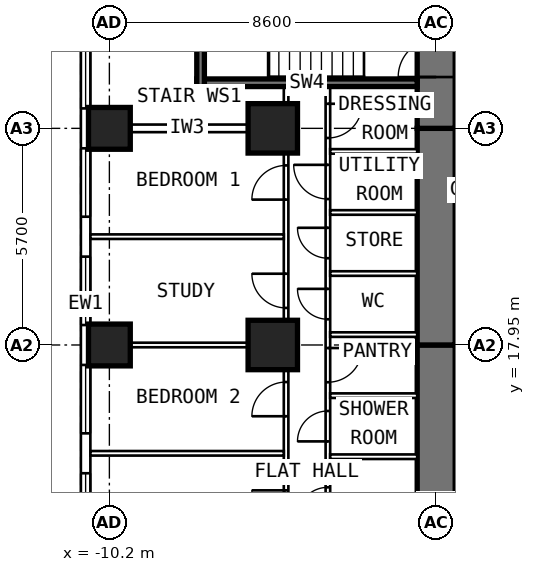
"""IFC4 building model, lengths in metres.
Left out: names, types, materials, properties, quantities, classifications, styles, units other than length and angle.
Written with IfcOpenShell. Run it as: python <this file> out.ifc"""

import sys

from ifc_helpers import new_model, si_unit, direction, frame, frame_2d, origin, origin_2d, place, context, subcontext, project, spatial, rectangle, extrude, element, fill, save


model = new_model("IFC4")
c1 = context("Model", 3, precision=1e-05, world=origin(), true_north=direction((0.0, 1.0)))
c2 = subcontext(c1, "Body", "Model", "MODEL_VIEW")
j1 = project(units=[si_unit("LENGTHUNIT", "METRE"), si_unit("PLANEANGLEUNIT", "RADIAN")], contexts=[c1])
p1 = place(None, origin())
s1 = spatial("IfcSite", under=j1, at=p1, CompositionType="ELEMENT")
p2 = place(p1, origin())
s2 = spatial("IfcBuilding", under=s1, at=p2, CompositionType="ELEMENT")
p3 = place(p2, frame((0.0, 0.0, 39.4)))
s3 = spatial("IfcBuildingStorey", under=s2, at=p3, CompositionType="ELEMENT", Elevation=39.4)
for number, where, z_axis, x_axis in (
    (1, (-10.2, 17.95, 0.0), (0.0, 0.0, 1.0), (0.0, 1.0, 0.0)),
    (2, (-10.2, 23.65, 0.0), (0.0, 0.0, 1.0), (0.0, 1.0, 0.0)),
):
    element("IfcColumn", number, at=place(p3, frame(where, z_axis=z_axis, x_axis=x_axis)), inside=s3, PredefinedType="COLUMN", context=c2, shape_type="SweptSolid", body=[
        extrude(rectangle(XDim=1.1, YDim=1.1, at=origin_2d()), origin(), (0.0, 0.0, 1.0), 3.6),
    ])
for number, where, z_axis, x_axis in (
    (3, (-5.9, 17.95, 0.0), (0.0, 0.0, 1.0), (0.0, 1.0, 0.0)),
    (4, (-5.9, 23.65, 0.0), (0.0, 0.0, 1.0), (0.0, 1.0, 0.0)),
):
    element("IfcColumn", number, at=place(p3, frame(where, z_axis=z_axis, x_axis=x_axis)), inside=s3, PredefinedType="COLUMN", context=c2, shape_type="SweptSolid", body=[
        extrude(rectangle(XDim=1.3, YDim=1.3, at=origin_2d()), origin(), (0.0, 0.0, 1.0), 3.6),
    ])
p4 = place(p3, frame((-1.6, 9.6, 0.0), z_axis=(0.0, 0.0, 1.0), x_axis=(0.0, 1.0, 0.0)))
e5 = element("IfcWall", 5, at=p4, inside=s3, PredefinedType="SHEAR", context=c2, shape_type="SweptSolid", body=[
    extrude(rectangle(XDim=8.35, YDim=1.0, at=frame_2d((4.175, 0.0))), origin(), (0.0, 0.0, 1.0), 3.6),
])
p5 = place(p4, frame((1.3, 0.0, 0.0)))
e6 = element("IfcOpeningElement", 6, at=p5, cuts=e5, PredefinedType="OPENING", context=c2, shape_type="SweptSolid", body=[
    extrude(rectangle(XDim=1.0, YDim=2.1, at=frame_2d((0.5, 1.05))), frame((0.0, 0.512, 0.0), z_axis=(0.0, -1.0, 0.0), x_axis=(1.0, 0.0, 0.0)), (0.0, 0.0, 1.0), 1.024),
])
p6 = place(p3, frame((-1.6, 17.95, 0.0), z_axis=(0.0, 0.0, 1.0), x_axis=(0.0, 1.0, 0.0)))
e7 = element("IfcWall", 7, at=p6, inside=s3, PredefinedType="SHEAR", context=c2, shape_type="SweptSolid", body=[
    extrude(rectangle(XDim=5.7, YDim=1.0, at=frame_2d((2.85, 0.0))), origin(), (0.0, 0.0, 1.0), 3.6),
])
p7 = place(p3, frame((-1.6, 23.65, 0.0), z_axis=(0.0, 0.0, 1.0), x_axis=(0.0, 1.0, 0.0)))
e8 = element("IfcWall", 8, at=p7, inside=s3, PredefinedType="SHEAR", context=c2, shape_type="SweptSolid", body=[
    extrude(rectangle(XDim=10.745, YDim=1.0, at=frame_2d((5.373, 0.0))), origin(), (0.0, 0.0, 1.0), 3.6),
])
p8 = place(p7, frame((6.1, 0.0, 0.0)))
e9 = element("IfcOpeningElement", 9, at=p8, cuts=e8, PredefinedType="OPENING", context=c2, shape_type="SweptSolid", body=[
    extrude(rectangle(XDim=1.0, YDim=2.1, at=frame_2d((0.5, 1.05))), frame((0.0, 0.512, 0.0), z_axis=(0.0, -1.0, 0.0), x_axis=(1.0, 0.0, 0.0)), (0.0, 0.0, 1.0), 1.024),
])
p9 = place(p7, frame((1.35, 0.0, 0.0)))
e10 = element("IfcOpeningElement", 10, at=p9, cuts=e8, PredefinedType="OPENING", context=c2, shape_type="SweptSolid", body=[
    extrude(rectangle(XDim=1.0, YDim=2.1, at=frame_2d((0.5, 1.05))), frame((0.0, 0.512, 0.0), z_axis=(0.0, -1.0, 0.0), x_axis=(1.0, 0.0, 0.0)), (0.0, 0.0, 1.0), 1.024),
])
p10 = place(p3, frame((-10.825, 6.409, 0.0), z_axis=(0.0, 0.0, 1.0), x_axis=(0.0, 1.0, 0.0)))
e11 = element("IfcWall", 11, at=p10, inside=s3, PredefinedType="SOLIDWALL", context=c2, shape_type="SweptSolid", body=[
    extrude(rectangle(XDim=25.226, YDim=0.25, at=frame_2d((12.613, 0.0))), origin(), (0.0, 0.0, 1.0), 3.35),
])
p11 = place(p10, frame((0.666, 0.0, 0.8)))
e12 = element("IfcOpeningElement", 12, at=p11, cuts=e11, PredefinedType="OPENING", context=c2, shape_type="SweptSolid", body=[
    extrude(rectangle(XDim=1.8, YDim=1.8, at=frame_2d((0.9, 0.9))), frame((0.0, 0.137, 0.0), z_axis=(0.0, -1.0, 0.0), x_axis=(1.0, 0.0, 0.0)), (0.0, 0.0, 1.0), 0.274),
])
p12 = place(p10, frame((3.516, 0.0, 0.8)))
e13 = element("IfcOpeningElement", 13, at=p12, cuts=e11, PredefinedType="OPENING", context=c2, shape_type="SweptSolid", body=[
    extrude(rectangle(XDim=1.8, YDim=1.8, at=frame_2d((0.9, 0.9))), frame((0.0, 0.137, 0.0), z_axis=(0.0, -1.0, 0.0), x_axis=(1.0, 0.0, 0.0)), (0.0, 0.0, 1.0), 0.274),
])
p13 = place(p10, frame((6.366, 0.0, 0.8)))
e14 = element("IfcOpeningElement", 14, at=p13, cuts=e11, PredefinedType="OPENING", context=c2, shape_type="SweptSolid", body=[
    extrude(rectangle(XDim=1.8, YDim=1.8, at=frame_2d((0.9, 0.9))), frame((0.0, 0.137, 0.0), z_axis=(0.0, -1.0, 0.0), x_axis=(1.0, 0.0, 0.0)), (0.0, 0.0, 1.0), 0.274),
])
p14 = place(p10, frame((9.216, 0.0, 0.8)))
e15 = element("IfcOpeningElement", 15, at=p14, cuts=e11, PredefinedType="OPENING", context=c2, shape_type="SweptSolid", body=[
    extrude(rectangle(XDim=1.8, YDim=1.8, at=frame_2d((0.9, 0.9))), frame((0.0, 0.137, 0.0), z_axis=(0.0, -1.0, 0.0), x_axis=(1.0, 0.0, 0.0)), (0.0, 0.0, 1.0), 0.274),
])
p15 = place(p10, frame((12.066, 0.0, 0.8)))
e16 = element("IfcOpeningElement", 16, at=p15, cuts=e11, PredefinedType="OPENING", context=c2, shape_type="SweptSolid", body=[
    extrude(rectangle(XDim=1.8, YDim=1.8, at=frame_2d((0.9, 0.9))), frame((0.0, 0.137, 0.0), z_axis=(0.0, -1.0, 0.0), x_axis=(1.0, 0.0, 0.0)), (0.0, 0.0, 1.0), 0.274),
])
p16 = place(p10, frame((14.916, 0.0, 0.8)))
e17 = element("IfcOpeningElement", 17, at=p16, cuts=e11, PredefinedType="OPENING", context=c2, shape_type="SweptSolid", body=[
    extrude(rectangle(XDim=1.8, YDim=1.8, at=frame_2d((0.9, 0.9))), frame((0.0, 0.137, 0.0), z_axis=(0.0, -1.0, 0.0), x_axis=(1.0, 0.0, 0.0)), (0.0, 0.0, 1.0), 0.274),
])
p17 = place(p10, frame((17.766, 0.0, 0.8)))
e18 = element("IfcOpeningElement", 18, at=p17, cuts=e11, PredefinedType="OPENING", context=c2, shape_type="SweptSolid", body=[
    extrude(rectangle(XDim=1.8, YDim=1.8, at=frame_2d((0.9, 0.9))), frame((0.0, 0.137, 0.0), z_axis=(0.0, -1.0, 0.0), x_axis=(1.0, 0.0, 0.0)), (0.0, 0.0, 1.0), 0.274),
])
p18 = place(p10, frame((20.616, 0.0, 0.8)))
e19 = element("IfcOpeningElement", 19, at=p18, cuts=e11, PredefinedType="OPENING", context=c2, shape_type="SweptSolid", body=[
    extrude(rectangle(XDim=1.8, YDim=1.8, at=frame_2d((0.9, 0.9))), frame((0.0, 0.137, 0.0), z_axis=(0.0, -1.0, 0.0), x_axis=(1.0, 0.0, 0.0)), (0.0, 0.0, 1.0), 0.274),
])
p19 = place(p3, frame((-4.45, 10.1, 0.0), z_axis=(0.0, 0.0, 1.0), x_axis=(0.0, 1.0, 0.0)))
e20 = element("IfcWall", 20, at=p19, inside=s3, PredefinedType="PARTITIONING", context=c2, shape_type="SweptSolid", body=[
    extrude(rectangle(XDim=14.65, YDim=0.12, at=frame_2d((7.325, 0.0))), origin(), (0.0, 0.0, 1.0), 3.35),
])
p20 = place(p19, frame((0.75, 0.0, 0.0)))
e21 = element("IfcOpeningElement", 21, at=p20, cuts=e20, PredefinedType="OPENING", context=c2, shape_type="SweptSolid", body=[
    extrude(rectangle(XDim=0.9, YDim=2.1, at=frame_2d((0.45, 1.05))), frame((0.0, 0.072, 0.0), z_axis=(0.0, -1.0, 0.0), x_axis=(1.0, 0.0, 0.0)), (0.0, 0.0, 1.0), 0.144),
])
p21 = place(p19, frame((3.305, 0.0, 0.0)))
e22 = element("IfcOpeningElement", 22, at=p21, cuts=e20, PredefinedType="OPENING", context=c2, shape_type="SweptSolid", body=[
    extrude(rectangle(XDim=0.8, YDim=2.1, at=frame_2d((0.4, 1.05))), frame((0.0, 0.072, 0.0), z_axis=(0.0, -1.0, 0.0), x_axis=(1.0, 0.0, 0.0)), (0.0, 0.0, 1.0), 0.144),
])
p22 = place(p19, frame((5.313, 0.0, 0.0)))
e23 = element("IfcOpeningElement", 23, at=p22, cuts=e20, PredefinedType="OPENING", context=c2, shape_type="SweptSolid", body=[
    extrude(rectangle(XDim=0.8, YDim=2.1, at=frame_2d((0.4, 1.05))), frame((0.0, 0.072, 0.0), z_axis=(0.0, -1.0, 0.0), x_axis=(1.0, 0.0, 0.0)), (0.0, 0.0, 1.0), 0.144),
])
p23 = place(p19, frame((6.87, 0.0, 0.0)))
e24 = element("IfcOpeningElement", 24, at=p23, cuts=e20, PredefinedType="OPENING", context=c2, shape_type="SweptSolid", body=[
    extrude(rectangle(XDim=0.9, YDim=2.1, at=frame_2d((0.45, 1.05))), frame((0.0, 0.072, 0.0), z_axis=(0.0, -1.0, 0.0), x_axis=(1.0, 0.0, 0.0)), (0.0, 0.0, 1.0), 0.144),
])
p24 = place(p19, frame((8.527, 0.0, 0.0)))
e25 = element("IfcOpeningElement", 25, at=p24, cuts=e20, PredefinedType="OPENING", context=c2, shape_type="SweptSolid", body=[
    extrude(rectangle(XDim=0.8, YDim=2.1, at=frame_2d((0.4, 1.05))), frame((0.0, 0.072, 0.0), z_axis=(0.0, -1.0, 0.0), x_axis=(1.0, 0.0, 0.0)), (0.0, 0.0, 1.0), 0.144),
])
p25 = place(p19, frame((10.133, 0.0, 0.0)))
e26 = element("IfcOpeningElement", 26, at=p25, cuts=e20, PredefinedType="OPENING", context=c2, shape_type="SweptSolid", body=[
    extrude(rectangle(XDim=0.8, YDim=2.1, at=frame_2d((0.4, 1.05))), frame((0.0, 0.072, 0.0), z_axis=(0.0, -1.0, 0.0), x_axis=(1.0, 0.0, 0.0)), (0.0, 0.0, 1.0), 0.144),
])
p26 = place(p19, frame((11.69, 0.0, 0.0)))
e27 = element("IfcOpeningElement", 27, at=p26, cuts=e20, PredefinedType="OPENING", context=c2, shape_type="SweptSolid", body=[
    extrude(rectangle(XDim=0.9, YDim=2.1, at=frame_2d((0.45, 1.05))), frame((0.0, 0.072, 0.0), z_axis=(0.0, -1.0, 0.0), x_axis=(1.0, 0.0, 0.0)), (0.0, 0.0, 1.0), 0.144),
])
p27 = place(p19, frame((13.297, 0.0, 0.0)))
e28 = element("IfcOpeningElement", 28, at=p27, cuts=e20, PredefinedType="OPENING", context=c2, shape_type="SweptSolid", body=[
    extrude(rectangle(XDim=0.9, YDim=2.1, at=frame_2d((0.45, 1.05))), frame((0.0, 0.072, 0.0), z_axis=(0.0, -1.0, 0.0), x_axis=(1.0, 0.0, 0.0)), (0.0, 0.0, 1.0), 0.144),
])
p28 = place(p3, frame((-5.55, 9.691, 0.0), z_axis=(0.0, 0.0, 1.0), x_axis=(0.0, 1.0, 0.0)))
e29 = element("IfcWall", 29, at=p28, inside=s3, PredefinedType="PARTITIONING", context=c2, shape_type="SweptSolid", body=[
    extrude(rectangle(XDim=15.059, YDim=0.12, at=frame_2d((7.53, 0.0))), origin(), (0.0, 0.0, 1.0), 3.35),
])
p29 = place(p28, frame((0.859, 0.0, 0.0)))
e30 = element("IfcOpeningElement", 30, at=p29, cuts=e29, PredefinedType="OPENING", context=c2, shape_type="SweptSolid", body=[
    extrude(rectangle(XDim=0.9, YDim=2.1, at=frame_2d((0.45, 1.05))), frame((0.0, 0.072, 0.0), z_axis=(0.0, -1.0, 0.0), x_axis=(1.0, 0.0, 0.0)), (0.0, 0.0, 1.0), 0.144),
])
p30 = place(p28, frame((3.534, 0.0, 0.0)))
e31 = element("IfcOpeningElement", 31, at=p30, cuts=e29, PredefinedType="OPENING", context=c2, shape_type="SweptSolid", body=[
    extrude(rectangle(XDim=0.9, YDim=2.1, at=frame_2d((0.45, 1.05))), frame((0.0, 0.072, 0.0), z_axis=(0.0, -1.0, 0.0), x_axis=(1.0, 0.0, 0.0)), (0.0, 0.0, 1.0), 0.144),
])
p31 = place(p28, frame((6.384, 0.0, 0.0)))
e32 = element("IfcOpeningElement", 32, at=p31, cuts=e29, PredefinedType="OPENING", context=c2, shape_type="SweptSolid", body=[
    extrude(rectangle(XDim=0.9, YDim=2.1, at=frame_2d((0.45, 1.05))), frame((0.0, 0.072, 0.0), z_axis=(0.0, -1.0, 0.0), x_axis=(1.0, 0.0, 0.0)), (0.0, 0.0, 1.0), 0.144),
])
p32 = place(p28, frame((9.234, 0.0, 0.0)))
e33 = element("IfcOpeningElement", 33, at=p32, cuts=e29, PredefinedType="OPENING", context=c2, shape_type="SweptSolid", body=[
    extrude(rectangle(XDim=0.9, YDim=2.1, at=frame_2d((0.45, 1.05))), frame((0.0, 0.072, 0.0), z_axis=(0.0, -1.0, 0.0), x_axis=(1.0, 0.0, 0.0)), (0.0, 0.0, 1.0), 0.144),
])
p33 = place(p28, frame((12.084, 0.0, 0.0)))
e34 = element("IfcOpeningElement", 34, at=p33, cuts=e29, PredefinedType="OPENING", context=c2, shape_type="SweptSolid", body=[
    extrude(rectangle(XDim=0.9, YDim=2.1, at=frame_2d((0.45, 1.05))), frame((0.0, 0.072, 0.0), z_axis=(0.0, -1.0, 0.0), x_axis=(1.0, 0.0, 0.0)), (0.0, 0.0, 1.0), 0.144),
])
p34 = place(p3, frame((-5.61, 15.1, 0.0), z_axis=(0.0, 0.0, 1.0), x_axis=(-1.0, 0.0, 0.0)))
e35 = element("IfcWall", 35, at=p34, inside=s3, PredefinedType="PARTITIONING", context=c2, shape_type="SweptSolid", body=[
    extrude(rectangle(XDim=5.09, YDim=0.12, at=frame_2d((2.545, 0.0))), origin(), (0.0, 0.0, 1.0), 3.35),
])
p35 = place(p3, frame((-5.61, 17.95, 0.0), z_axis=(0.0, 0.0, 1.0), x_axis=(-1.0, 0.0, 0.0)))
e36 = element("IfcWall", 36, at=p35, inside=s3, PredefinedType="PARTITIONING", context=c2, shape_type="SweptSolid", body=[
    extrude(rectangle(XDim=5.09, YDim=0.12, at=frame_2d((2.545, 0.0))), origin(), (0.0, 0.0, 1.0), 2.45),
])
p36 = place(p3, frame((-5.61, 20.8, 0.0), z_axis=(0.0, 0.0, 1.0), x_axis=(-1.0, 0.0, 0.0)))
e37 = element("IfcWall", 37, at=p36, inside=s3, PredefinedType="PARTITIONING", context=c2, shape_type="SweptSolid", body=[
    extrude(rectangle(XDim=5.09, YDim=0.12, at=frame_2d((2.545, 0.0))), origin(), (0.0, 0.0, 1.0), 3.35),
])
for number, where, z_axis, x_axis in (
    (38, (-2.1, 15.01, 0.0), (0.0, 0.0, 1.0), (-1.0, 0.0, 0.0)),
    (39, (-2.1, 16.617, 0.0), (0.0, 0.0, 1.0), (-1.0, 0.0, 0.0)),
):
    element("IfcWall", number, at=place(p3, frame(where, z_axis=z_axis, x_axis=x_axis)), inside=s3, PredefinedType="PARTITIONING", context=c2, shape_type="SweptSolid", body=[
        extrude(rectangle(XDim=2.29, YDim=0.12, at=frame_2d((1.145, 0.0))), origin(), (0.0, 0.0, 1.0), 3.35),
    ])
p37 = place(p3, frame((-2.1, 18.223, 0.0), z_axis=(0.0, 0.0, 1.0), x_axis=(-1.0, 0.0, 0.0)))
e40 = element("IfcWall", 40, at=p37, inside=s3, PredefinedType="PARTITIONING", context=c2, shape_type="SweptSolid", body=[
    extrude(rectangle(XDim=2.29, YDim=0.12, at=frame_2d((1.145, 0.0))), origin(), (0.0, 0.0, 1.0), 2.45),
])
for number, where, z_axis, x_axis in (
    (41, (-2.1, 19.83, 0.0), (0.0, 0.0, 1.0), (-1.0, 0.0, 0.0)),
    (42, (-2.1, 21.437, 0.0), (0.0, 0.0, 1.0), (-1.0, 0.0, 0.0)),
    (43, (-2.1, 23.043, 0.0), (0.0, 0.0, 1.0), (-1.0, 0.0, 0.0)),
):
    element("IfcWall", number, at=place(p3, frame(where, z_axis=z_axis, x_axis=x_axis)), inside=s3, PredefinedType="PARTITIONING", context=c2, shape_type="SweptSolid", body=[
        extrude(rectangle(XDim=2.29, YDim=0.12, at=frame_2d((1.145, 0.0))), origin(), (0.0, 0.0, 1.0), 3.35),
    ])
p38 = place(p3, frame((-5.61, 23.65, 0.0), z_axis=(0.0, 0.0, 1.0), x_axis=(-1.0, 0.0, 0.0)))
e44 = element("IfcWall", 44, at=p38, inside=s3, PredefinedType="PARTITIONING", context=c2, shape_type="SweptSolid", body=[
    extrude(rectangle(XDim=5.09, YDim=0.2, at=frame_2d((2.545, 0.0))), origin(), (0.0, 0.0, 1.0), 2.45),
])
p39 = place(p3, frame((-2.1, 24.85, 0.0), z_axis=(0.0, 0.0, 1.0), x_axis=(-1.0, 0.0, 0.0)))
e45 = element("IfcWall", 45, at=p39, inside=s3, PredefinedType="SHEAR", context=c2, shape_type="SweptSolid", body=[
    extrude(rectangle(XDim=5.8, YDim=0.2, at=frame_2d((2.9, 0.0))), origin(), (0.0, 0.0, 1.0), 3.33),
])
p40 = place(p3, frame((-7.8, 24.75, 0.0), z_axis=(0.0, 0.0, 1.0), x_axis=(0.0, 1.0, 0.0)))
e46 = element("IfcWall", 46, at=p40, inside=s3, PredefinedType="SHEAR", context=c2, shape_type="SweptSolid", body=[
    extrude(rectangle(XDim=4.0, YDim=0.2, at=frame_2d((2.0, 0.0))), origin(), (0.0, 0.0, 1.0), 3.33),
])
p41 = place(p13, origin())
e47 = element("IfcWindow", 47, at=p41, inside=s3, PartitioningType="SINGLE_PANEL", PredefinedType="WINDOW", context=c2, shape_type="SweptSolid", body=[
    extrude(rectangle(XDim=1.8, YDim=1.8, at=frame_2d((0.9, 0.9))), frame((0.0, 0.03, 0.0), z_axis=(0.0, -1.0, 0.0), x_axis=(1.0, 0.0, 0.0)), (0.0, 0.0, 1.0), 0.06),
])
fill(e14, e47)
p42 = place(p14, origin())
e48 = element("IfcWindow", 48, at=p42, inside=s3, PartitioningType="SINGLE_PANEL", PredefinedType="WINDOW", context=c2, shape_type="SweptSolid", body=[
    extrude(rectangle(XDim=1.8, YDim=1.8, at=frame_2d((0.9, 0.9))), frame((0.0, 0.03, 0.0), z_axis=(0.0, -1.0, 0.0), x_axis=(1.0, 0.0, 0.0)), (0.0, 0.0, 1.0), 0.06),
])
fill(e15, e48)
p43 = place(p15, origin())
e49 = element("IfcWindow", 49, at=p43, inside=s3, PartitioningType="SINGLE_PANEL", PredefinedType="WINDOW", context=c2, shape_type="SweptSolid", body=[
    extrude(rectangle(XDim=1.8, YDim=1.8, at=frame_2d((0.9, 0.9))), frame((0.0, 0.03, 0.0), z_axis=(0.0, -1.0, 0.0), x_axis=(1.0, 0.0, 0.0)), (0.0, 0.0, 1.0), 0.06),
])
fill(e16, e49)
p44 = place(p16, origin())
e50 = element("IfcWindow", 50, at=p44, inside=s3, PartitioningType="SINGLE_PANEL", PredefinedType="WINDOW", context=c2, shape_type="SweptSolid", body=[
    extrude(rectangle(XDim=1.8, YDim=1.8, at=frame_2d((0.9, 0.9))), frame((0.0, 0.03, 0.0), z_axis=(0.0, -1.0, 0.0), x_axis=(1.0, 0.0, 0.0)), (0.0, 0.0, 1.0), 0.06),
])
fill(e17, e50)
p45 = place(p17, origin())
e51 = element("IfcWindow", 51, at=p45, inside=s3, PartitioningType="SINGLE_PANEL", PredefinedType="WINDOW", context=c2, shape_type="SweptSolid", body=[
    extrude(rectangle(XDim=1.8, YDim=1.8, at=frame_2d((0.9, 0.9))), frame((0.0, 0.03, 0.0), z_axis=(0.0, -1.0, 0.0), x_axis=(1.0, 0.0, 0.0)), (0.0, 0.0, 1.0), 0.06),
])
fill(e18, e51)
p46 = place(p30, origin())
e52 = element("IfcDoor", 52, at=p46, inside=s3, OperationType="SINGLE_SWING_RIGHT", PredefinedType="DOOR", context=c2, shape_type="SweptSolid", body=[
    extrude(rectangle(XDim=0.9, YDim=2.1, at=frame_2d((0.45, 1.05))), frame((0.0, 0.025, 0.0), z_axis=(0.0, -1.0, 0.0), x_axis=(1.0, 0.0, 0.0)), (0.0, 0.0, 1.0), 0.05),
])
fill(e31, e52)
p47 = place(p31, origin())
e53 = element("IfcDoor", 53, at=p47, inside=s3, OperationType="SINGLE_SWING_LEFT", PredefinedType="DOOR", context=c2, shape_type="SweptSolid", body=[
    extrude(rectangle(XDim=0.9, YDim=2.1, at=frame_2d((0.45, 1.05))), frame((0.0, 0.025, 0.0), z_axis=(0.0, -1.0, 0.0), x_axis=(1.0, 0.0, 0.0)), (0.0, 0.0, 1.0), 0.05),
])
fill(e32, e53)
p48 = place(p32, origin())
e54 = element("IfcDoor", 54, at=p48, inside=s3, OperationType="SINGLE_SWING_RIGHT", PredefinedType="DOOR", context=c2, shape_type="SweptSolid", body=[
    extrude(rectangle(XDim=0.9, YDim=2.1, at=frame_2d((0.45, 1.05))), frame((0.0, 0.025, 0.0), z_axis=(0.0, -1.0, 0.0), x_axis=(1.0, 0.0, 0.0)), (0.0, 0.0, 1.0), 0.05),
])
fill(e33, e54)
p49 = place(p33, origin())
e55 = element("IfcDoor", 55, at=p49, inside=s3, OperationType="SINGLE_SWING_LEFT", PredefinedType="DOOR", context=c2, shape_type="SweptSolid", body=[
    extrude(rectangle(XDim=0.9, YDim=2.1, at=frame_2d((0.45, 1.05))), frame((0.0, 0.025, 0.0), z_axis=(0.0, -1.0, 0.0), x_axis=(1.0, 0.0, 0.0)), (0.0, 0.0, 1.0), 0.05),
])
fill(e34, e55)
p50 = place(p21, origin())
e56 = element("IfcDoor", 56, at=p50, inside=s3, OperationType="SINGLE_SWING_LEFT", PredefinedType="DOOR", context=c2, shape_type="SweptSolid", body=[
    extrude(rectangle(XDim=0.8, YDim=2.1, at=frame_2d((0.4, 1.05))), frame((0.0, 0.025, 0.0), z_axis=(0.0, -1.0, 0.0), x_axis=(1.0, 0.0, 0.0)), (0.0, 0.0, 1.0), 0.05),
])
fill(e22, e56)
p51 = place(p22, origin())
e57 = element("IfcDoor", 57, at=p51, inside=s3, OperationType="SINGLE_SWING_LEFT", PredefinedType="DOOR", context=c2, shape_type="SweptSolid", body=[
    extrude(rectangle(XDim=0.8, YDim=2.1, at=frame_2d((0.4, 1.05))), frame((0.0, 0.025, 0.0), z_axis=(0.0, -1.0, 0.0), x_axis=(1.0, 0.0, 0.0)), (0.0, 0.0, 1.0), 0.05),
])
fill(e23, e57)
p52 = place(p23, frame((0.9, 0.0, 0.0), z_axis=(0.0, 0.0, 1.0), x_axis=(-1.0, 0.0, 0.0)))
e58 = element("IfcDoor", 58, at=p52, inside=s3, OperationType="SINGLE_SWING_LEFT", PredefinedType="DOOR", context=c2, shape_type="SweptSolid", body=[
    extrude(rectangle(XDim=0.9, YDim=2.1, at=frame_2d((0.45, 1.05))), frame((0.0, 0.025, 0.0), z_axis=(0.0, -1.0, 0.0), x_axis=(1.0, 0.0, 0.0)), (0.0, 0.0, 1.0), 0.05),
])
fill(e24, e58)
p53 = place(p24, origin())
e59 = element("IfcDoor", 59, at=p53, inside=s3, OperationType="SINGLE_SWING_RIGHT", PredefinedType="DOOR", context=c2, shape_type="SweptSolid", body=[
    extrude(rectangle(XDim=0.8, YDim=2.1, at=frame_2d((0.4, 1.05))), frame((0.0, 0.025, 0.0), z_axis=(0.0, -1.0, 0.0), x_axis=(1.0, 0.0, 0.0)), (0.0, 0.0, 1.0), 0.05),
])
fill(e25, e59)
p54 = place(p25, origin())
e60 = element("IfcDoor", 60, at=p54, inside=s3, OperationType="SINGLE_SWING_RIGHT", PredefinedType="DOOR", context=c2, shape_type="SweptSolid", body=[
    extrude(rectangle(XDim=0.8, YDim=2.1, at=frame_2d((0.4, 1.05))), frame((0.0, 0.025, 0.0), z_axis=(0.0, -1.0, 0.0), x_axis=(1.0, 0.0, 0.0)), (0.0, 0.0, 1.0), 0.05),
])
fill(e26, e60)
p55 = place(p26, origin())
e61 = element("IfcDoor", 61, at=p55, inside=s3, OperationType="SINGLE_SWING_RIGHT", PredefinedType="DOOR", context=c2, shape_type="SweptSolid", body=[
    extrude(rectangle(XDim=0.9, YDim=2.1, at=frame_2d((0.45, 1.05))), frame((0.0, 0.025, 0.0), z_axis=(0.0, -1.0, 0.0), x_axis=(1.0, 0.0, 0.0)), (0.0, 0.0, 1.0), 0.05),
])
fill(e27, e61)
p56 = place(p27, frame((0.9, 0.0, 0.0), z_axis=(0.0, 0.0, 1.0), x_axis=(-1.0, 0.0, 0.0)))
e62 = element("IfcDoor", 62, at=p56, inside=s3, OperationType="SINGLE_SWING_LEFT", PredefinedType="DOOR", context=c2, shape_type="SweptSolid", body=[
    extrude(rectangle(XDim=0.9, YDim=2.1, at=frame_2d((0.45, 1.05))), frame((0.0, 0.025, 0.0), z_axis=(0.0, -1.0, 0.0), x_axis=(1.0, 0.0, 0.0)), (0.0, 0.0, 1.0), 0.05),
])
fill(e28, e62)
p57 = place(p9, origin())
e63 = element("IfcDoor", 63, at=p57, inside=s3, OperationType="SINGLE_SWING_LEFT", PredefinedType="DOOR", context=c2, shape_type="SweptSolid", body=[
    extrude(rectangle(XDim=1.0, YDim=2.1, at=frame_2d((0.5, 1.05))), frame((0.0, 0.25, 0.0), z_axis=(0.0, -1.0, 0.0), x_axis=(1.0, 0.0, 0.0)), (0.0, 0.0, 1.0), 0.5),
])
fill(e10, e63)
save(model, sys.argv[1])
